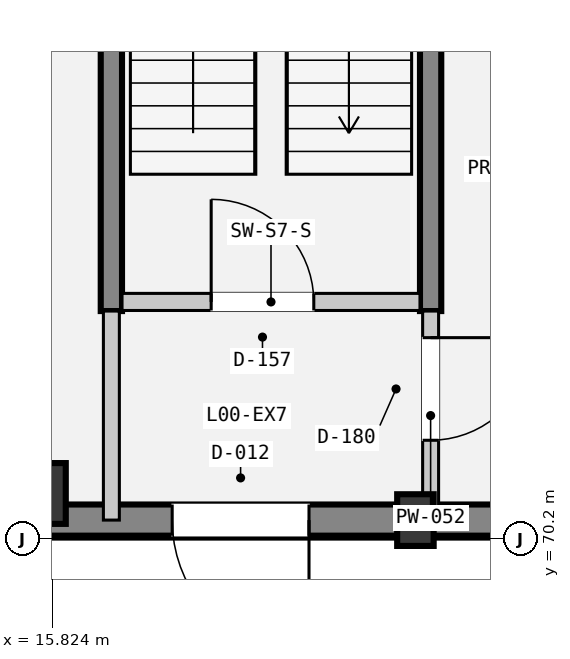
"""IFC4 building model, lengths in metres.
Left out: names, types, materials, properties, quantities, classifications, styles, units other than length and angle.
Written with IfcOpenShell. Run it as: python <this file> out.ifc"""

import sys

from ifc_helpers import new_model, si_unit, direction, frame, frame_2d, origin, origin_2d, place, context, subcontext, project, spatial, rectangle, extrude, element, fill, save


model = new_model("IFC4")
c1 = context("Model", 3, precision=1e-05, world=origin(), true_north=direction((0.0, 1.0)))
c2 = subcontext(c1, "Body", "Model", "MODEL_VIEW")
j1 = project(units=[si_unit("LENGTHUNIT", "METRE"), si_unit("PLANEANGLEUNIT", "RADIAN")], contexts=[c1])
p1 = place(None, origin())
s1 = spatial("IfcSite", under=j1, at=p1, CompositionType="ELEMENT")
p2 = place(p1, origin())
s2 = spatial("IfcBuilding", under=s1, at=p2, CompositionType="ELEMENT")
p3 = place(p2, origin())
s3 = spatial("IfcBuildingStorey", under=s2, at=p3, CompositionType="ELEMENT", Elevation=0.0)
p4 = place(p3, frame((15.6, 70.8, 0.0), z_axis=(0.0, 0.0, 1.0), x_axis=(1.0, 0.0, 0.0)))
e1 = element("IfcColumn", 1, at=p4, inside=s3, PredefinedType="COLUMN", context=c2, shape_type="SweptSolid", body=[
    extrude(rectangle(XDim=0.8, YDim=0.8, at=origin_2d()), origin(), (0.0, 0.0, 1.0), 5.4),
])
p5 = place(p3, frame((20.6, 70.45, 0.0), z_axis=(0.0, 0.0, 1.0), x_axis=(1.0, 0.0, 0.0)))
e2 = element("IfcColumn", 2, at=p5, inside=s3, PredefinedType="PILASTER", context=c2, shape_type="SweptSolid", body=[
    extrude(rectangle(XDim=0.48, YDim=0.68, at=origin_2d()), origin(), (0.0, 0.0, 1.0), 5.4),
])
for number, where, z_axis, x_axis in (
    (3, (16.6, 73.2, 0.0), (0.0, 0.0, 1.0), (0.0, 1.0, 0.0)),
    (4, (20.8, 73.2, 0.0), (0.0, 0.0, 1.0), (0.0, 1.0, 0.0)),
):
    element("IfcWall", number, at=place(p3, frame(where, z_axis=z_axis, x_axis=x_axis)), inside=s3, PredefinedType="SHEAR", context=c2, shape_type="SweptSolid", body=[
        extrude(rectangle(XDim=8.4, YDim=0.28, at=frame_2d((4.2, 0.0))), origin(), (0.0, 0.0, 1.0), 5.4),
    ])
p6 = place(p3, frame((46.45, 70.45, 0.0), z_axis=(0.0, 0.0, 1.0), x_axis=(-1.0, 0.0, 0.0)))
e5 = element("IfcWall", 5, at=p6, inside=s3, PredefinedType="SOLIDWALL", context=c2, shape_type="SweptSolid", body=[
    extrude(rectangle(XDim=35.45, YDim=0.41, at=frame_2d((17.725, 0.0))), origin(), (0.0, 0.0, 1.0), 5.4),
])
p7 = place(p6, frame((17.95, 0.0, 0.0)))
e6 = element("IfcOpeningElement", 6, at=p7, cuts=e5, PredefinedType="OPENING", context=c2, shape_type="SweptSolid", body=[
    extrude(rectangle(XDim=2.4, YDim=2.6, at=frame_2d((1.2, 1.3))), frame((0.0, 0.215, 0.0), z_axis=(0.0, -1.0, 0.0), x_axis=(1.0, 0.0, 0.0)), (0.0, 0.0, 1.0), 0.43),
])
p8 = place(p6, frame((27.25, 0.0, 0.0)))
e7 = element("IfcOpeningElement", 7, at=p8, cuts=e5, PredefinedType="OPENING", context=c2, shape_type="SweptSolid", body=[
    extrude(rectangle(XDim=1.8, YDim=2.4, at=frame_2d((0.9, 1.2))), frame((0.0, 0.215, 0.0), z_axis=(0.0, -1.0, 0.0), x_axis=(1.0, 0.0, 0.0)), (0.0, 0.0, 1.0), 0.43),
])
p9 = place(p6, frame((2.55, 0.0, 0.95)))
e8 = element("IfcOpeningElement", 8, at=p9, cuts=e5, PredefinedType="OPENING", context=c2, shape_type="SweptSolid", body=[
    extrude(rectangle(XDim=1.8, YDim=2.1, at=frame_2d((0.9, 1.05))), frame((0.0, 0.215, 0.0), z_axis=(0.0, -1.0, 0.0), x_axis=(1.0, 0.0, 0.0)), (0.0, 0.0, 1.0), 0.43),
])
p10 = place(p3, frame((16.74, 73.32, 0.0), z_axis=(0.0, 0.0, 1.0), x_axis=(1.0, 0.0, 0.0)))
e9 = element("IfcWall", 9, at=p10, inside=s3, PredefinedType="PARTITIONING", context=c2, shape_type="SweptSolid", body=[
    extrude(rectangle(XDim=3.92, YDim=0.225, at=frame_2d((1.96, 0.0))), origin(), (0.0, 0.0, 1.0), 4.11),
])
p11 = place(p10, frame((1.173, 0.0, 0.0)))
e10 = element("IfcOpeningElement", 10, at=p11, cuts=e9, PredefinedType="OPENING", context=c2, shape_type="SweptSolid", body=[
    extrude(rectangle(XDim=1.35, YDim=2.2, at=frame_2d((0.675, 1.1))), frame((0.0, 0.123, 0.0), z_axis=(0.0, -1.0, 0.0), x_axis=(1.0, 0.0, 0.0)), (0.0, 0.0, 1.0), 0.245),
])
p12 = place(p3, frame((20.8, 73.2, 0.0), z_axis=(0.0, 0.0, 1.0), x_axis=(0.0, -1.0, 0.0)))
e11 = element("IfcWall", 11, at=p12, inside=s3, PredefinedType="PARTITIONING", context=c2, shape_type="SweptSolid", body=[
    extrude(rectangle(XDim=2.75, YDim=0.21, at=frame_2d((1.375, 0.0))), origin(), (0.0, 0.0, 1.0), 3.45),
])
p13 = place(p12, frame((0.35, 0.0, 0.0)))
e12 = element("IfcOpeningElement", 12, at=p13, cuts=e11, PredefinedType="OPENING", context=c2, shape_type="SweptSolid", body=[
    extrude(rectangle(XDim=1.35, YDim=2.2, at=frame_2d((0.675, 1.1))), frame((0.0, 0.115, 0.0), z_axis=(0.0, -1.0, 0.0), x_axis=(1.0, 0.0, 0.0)), (0.0, 0.0, 1.0), 0.23),
])
p14 = place(p3, frame((16.6, 73.2, 0.0), z_axis=(0.0, 0.0, 1.0), x_axis=(0.0, -1.0, 0.0)))
e13 = element("IfcWall", 13, at=p14, inside=s3, PredefinedType="PARTITIONING", context=c2, shape_type="SweptSolid", body=[
    extrude(rectangle(XDim=2.75, YDim=0.21, at=frame_2d((1.375, 0.0))), origin(), (0.0, 0.0, 1.0), 3.45),
])
p15 = place(p8, origin())
e14 = element("IfcDoor", 14, at=p15, inside=s3, OperationType="DOUBLE_DOOR_SINGLE_SWING", PredefinedType="DOOR", context=c2, shape_type="SweptSolid", body=[
    extrude(rectangle(XDim=1.8, YDim=2.4, at=frame_2d((0.9, 1.2))), frame((0.0, 0.025, 0.0), z_axis=(0.0, -1.0, 0.0), x_axis=(1.0, 0.0, 0.0)), (0.0, 0.0, 1.0), 0.05),
])
fill(e7, e14)
p16 = place(p11, origin())
e15 = element("IfcDoor", 15, at=p16, inside=s3, OperationType="SINGLE_SWING_LEFT", PredefinedType="DOOR", context=c2, shape_type="SweptSolid", body=[
    extrude(rectangle(XDim=1.35, YDim=2.2, at=frame_2d((0.675, 1.1))), frame((0.0, 0.025, 0.0), z_axis=(0.0, -1.0, 0.0), x_axis=(1.0, 0.0, 0.0)), (0.0, 0.0, 1.0), 0.05),
])
fill(e10, e15)
p17 = place(p13, origin())
e16 = element("IfcDoor", 16, at=p17, inside=s3, OperationType="SINGLE_SWING_LEFT", PredefinedType="DOOR", context=c2, shape_type="SweptSolid", body=[
    extrude(rectangle(XDim=1.35, YDim=2.2, at=frame_2d((0.675, 1.1))), frame((0.0, 0.025, 0.0), z_axis=(0.0, -1.0, 0.0), x_axis=(1.0, 0.0, 0.0)), (0.0, 0.0, 1.0), 0.05),
])
fill(e12, e16)
save(model, sys.argv[1])
